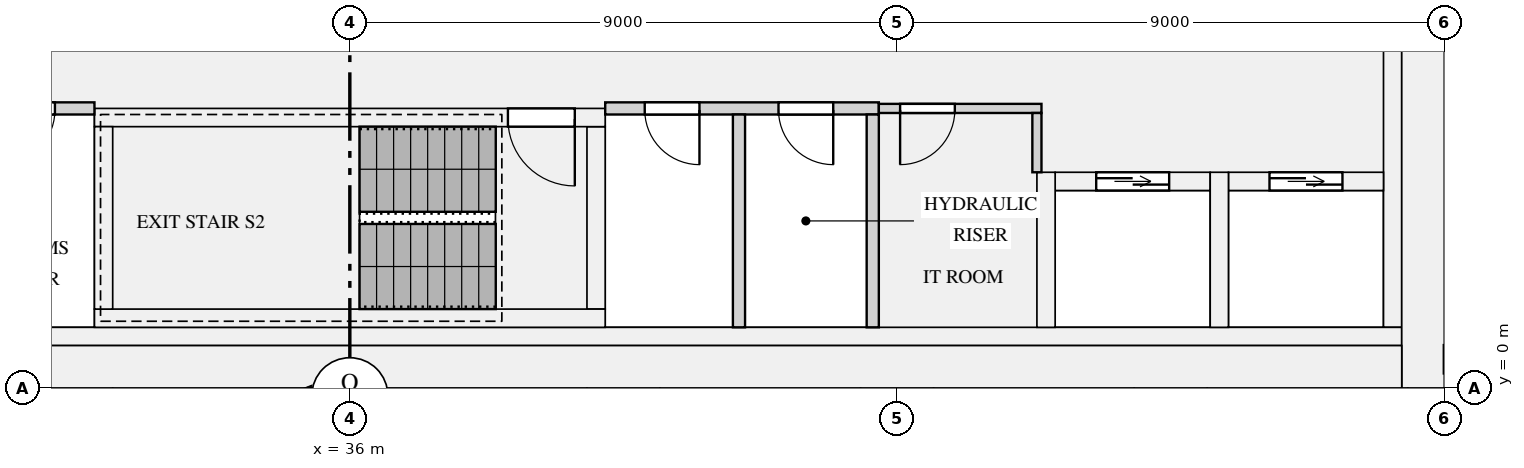
"""IFC4 building model, lengths in metres.
Left out: names, types, materials, properties, quantities, classifications, styles, units other than length and angle.
Written with IfcOpenShell. Run it as: python <this file> out.ifc"""

import sys

from ifc_helpers import new_model, si_unit, direction, frame, frame_2d, origin, place, context, subcontext, project, spatial, rectangle, extrude, element, fill, save


model = new_model("IFC4")
c1 = context("Model", 3, precision=1e-05, world=origin(), true_north=direction((0.0, 1.0)))
c2 = subcontext(c1, "Body", "Model", "MODEL_VIEW")
j1 = project(units=[si_unit("LENGTHUNIT", "METRE"), si_unit("PLANEANGLEUNIT", "RADIAN")], contexts=[c1])
p1 = place(None, origin())
s1 = spatial("IfcSite", under=j1, at=p1, CompositionType="ELEMENT")
p2 = place(p1, origin())
s2 = spatial("IfcBuilding", under=s1, at=p2, CompositionType="ELEMENT")
p3 = place(p2, frame((0.0, 0.0, 166.5)))
s3 = spatial("IfcBuildingStorey", under=s2, at=p3, CompositionType="ELEMENT", Elevation=166.5)
p4 = place(p3, frame((53.65, 0.0, 0.0), z_axis=(0.0, 0.0, 1.0), x_axis=(0.0, 1.0, 0.0)))
e1 = element("IfcWall", 1, at=p4, inside=s3, PredefinedType="SHEAR", context=c2, shape_type="SweptSolid", body=[
    extrude(rectangle(XDim=12.5, YDim=0.7, at=frame_2d((6.25, 0.0))), origin(), (0.0, 0.0, 1.0), 3.15),
])
p5 = place(p3, frame((18.7, 0.35, 0.0), z_axis=(0.0, 0.0, 1.0), x_axis=(1.0, 0.0, 0.0)))
e2 = element("IfcWall", 2, at=p5, inside=s3, PredefinedType="SHEAR", context=c2, shape_type="SweptSolid", body=[
    extrude(rectangle(XDim=34.6, YDim=0.7, at=frame_2d((17.3, 0.0))), origin(), (0.0, 0.0, 1.0), 3.15),
])
p6 = place(p3, frame((53.15, 1.0, 0.0), z_axis=(0.0, 0.0, 1.0), x_axis=(0.0, 1.0, 0.0)))
e3 = element("IfcWall", 3, at=p6, inside=s3, PredefinedType="SHEAR", context=c2, shape_type="SweptSolid", body=[
    extrude(rectangle(XDim=10.9, YDim=0.3, at=frame_2d((5.45, 0.0))), origin(), (0.0, 0.0, 1.0), 3.15),
])
p7 = place(p3, frame((18.7, 0.85, 0.0), z_axis=(0.0, 0.0, 1.0), x_axis=(1.0, 0.0, 0.0)))
e4 = element("IfcWall", 4, at=p7, inside=s3, PredefinedType="SHEAR", context=c2, shape_type="SweptSolid", body=[
    extrude(rectangle(XDim=34.6, YDim=0.3, at=frame_2d((17.3, 0.0))), origin(), (0.0, 0.0, 1.0), 3.15),
])
p8 = place(p3, frame((47.6, 3.4, 0.0), z_axis=(0.0, 0.0, 1.0), x_axis=(1.0, 0.0, 0.0)))
e5 = element("IfcWall", 5, at=p8, inside=s3, PredefinedType="SHEAR", context=c2, shape_type="SweptSolid", body=[
    extrude(rectangle(XDim=2.55, YDim=0.3, at=frame_2d((1.275, 0.0))), origin(), (0.0, 0.0, 1.0), 3.15),
])
p9 = place(p8, frame((0.675, 0.0, 0.0)))
e6 = element("IfcOpeningElement", 6, at=p9, cuts=e5, PredefinedType="OPENING", context=c2, shape_type="SweptSolid", body=[
    extrude(rectangle(XDim=1.2, YDim=2.1, at=frame_2d((0.6, 1.05))), frame((0.0, 0.16, 0.0), z_axis=(0.0, -1.0, 0.0), x_axis=(1.0, 0.0, 0.0)), (0.0, 0.0, 1.0), 0.32),
])
p10 = place(p3, frame((47.45, 1.0, 0.0), z_axis=(0.0, 0.0, 1.0), x_axis=(0.0, 1.0, 0.0)))
e7 = element("IfcWall", 7, at=p10, inside=s3, PredefinedType="SHEAR", context=c2, shape_type="SweptSolid", body=[
    extrude(rectangle(XDim=2.55, YDim=0.3, at=frame_2d((1.275, 0.0))), origin(), (0.0, 0.0, 1.0), 3.15),
])
p11 = place(p3, frame((50.45, 3.4, 0.0), z_axis=(0.0, 0.0, 1.0), x_axis=(1.0, 0.0, 0.0)))
e8 = element("IfcWall", 8, at=p11, inside=s3, PredefinedType="SHEAR", context=c2, shape_type="SweptSolid", body=[
    extrude(rectangle(XDim=2.55, YDim=0.3, at=frame_2d((1.275, 0.0))), origin(), (0.0, 0.0, 1.0), 3.15),
])
p12 = place(p11, frame((0.675, 0.0, 0.0)))
e9 = element("IfcOpeningElement", 9, at=p12, cuts=e8, PredefinedType="OPENING", context=c2, shape_type="SweptSolid", body=[
    extrude(rectangle(XDim=1.2, YDim=2.1, at=frame_2d((0.6, 1.05))), frame((0.0, 0.16, 0.0), z_axis=(0.0, -1.0, 0.0), x_axis=(1.0, 0.0, 0.0)), (0.0, 0.0, 1.0), 0.32),
])
p13 = place(p3, frame((50.3, 1.0, 0.0), z_axis=(0.0, 0.0, 1.0), x_axis=(0.0, 1.0, 0.0)))
e10 = element("IfcWall", 10, at=p13, inside=s3, PredefinedType="SHEAR", context=c2, shape_type="SweptSolid", body=[
    extrude(rectangle(XDim=2.55, YDim=0.3, at=frame_2d((1.275, 0.0))), origin(), (0.0, 0.0, 1.0), 3.15),
])
p14 = place(p3, frame((31.8, 1.15, 0.0), z_axis=(0.0, 0.0, 1.0), x_axis=(1.0, 0.0, 0.0)))
e11 = element("IfcWall", 11, at=p14, inside=s3, PredefinedType="SHEAR", context=c2, shape_type="SweptSolid", body=[
    extrude(rectangle(XDim=8.4, YDim=0.3, at=frame_2d((4.2, 0.0))), origin(), (0.0, 0.0, 1.0), 3.15),
])
p15 = place(p3, frame((31.8, 4.45, 0.0), z_axis=(0.0, 0.0, 1.0), x_axis=(1.0, 0.0, 0.0)))
e12 = element("IfcWall", 12, at=p15, inside=s3, PredefinedType="SHEAR", context=c2, shape_type="SweptSolid", body=[
    extrude(rectangle(XDim=8.4, YDim=0.3, at=frame_2d((4.2, 0.0))), origin(), (0.0, 0.0, 1.0), 3.15),
])
p16 = place(p15, frame((6.8, 0.0, 0.0)))
e13 = element("IfcOpeningElement", 13, at=p16, cuts=e12, PredefinedType="OPENING", context=c2, shape_type="SweptSolid", body=[
    extrude(rectangle(XDim=1.1, YDim=2.1, at=frame_2d((0.55, 1.05))), frame((0.0, 0.16, 0.0), z_axis=(0.0, -1.0, 0.0), x_axis=(1.0, 0.0, 0.0)), (0.0, 0.0, 1.0), 0.32),
])
for number, where, z_axis, x_axis in (
    (14, (31.95, 1.3, 0.0), (0.0, 0.0, 1.0), (0.0, 1.0, 0.0)),
    (15, (40.05, 1.3, 0.0), (0.0, 0.0, 1.0), (0.0, 1.0, 0.0)),
):
    element("IfcWall", number, at=place(p3, frame(where, z_axis=z_axis, x_axis=x_axis)), inside=s3, PredefinedType="SHEAR", context=c2, shape_type="SweptSolid", body=[
        extrude(rectangle(XDim=3.0, YDim=0.3, at=frame_2d((1.5, 0.0))), origin(), (0.0, 0.0, 1.0), 3.15),
    ])
p17 = place(p3, frame((27.3, 4.6, 0.0), z_axis=(0.0, 0.0, 1.0), x_axis=(1.0, 0.0, 0.0)))
e16 = element("IfcWall", 16, at=p17, inside=s3, PredefinedType="PARTITIONING", context=c2, shape_type="SweptSolid", body=[
    extrude(rectangle(XDim=4.5, YDim=0.2, at=frame_2d((2.25, 0.0))), origin(), (0.0, 0.0, 1.0), 2.83),
])
p18 = place(p17, frame((0.75, 0.0, 0.0)))
e17 = element("IfcOpeningElement", 17, at=p18, cuts=e16, PredefinedType="OPENING", context=c2, shape_type="SweptSolid", body=[
    extrude(rectangle(XDim=0.9, YDim=2.1, at=frame_2d((0.45, 1.05))), frame((0.0, 0.11, 0.0), z_axis=(0.0, -1.0, 0.0), x_axis=(1.0, 0.0, 0.0)), (0.0, 0.0, 1.0), 0.22),
])
p19 = place(p17, frame((2.95, 0.0, 0.0)))
e18 = element("IfcOpeningElement", 18, at=p19, cuts=e16, PredefinedType="OPENING", context=c2, shape_type="SweptSolid", body=[
    extrude(rectangle(XDim=0.9, YDim=2.1, at=frame_2d((0.45, 1.05))), frame((0.0, 0.11, 0.0), z_axis=(0.0, -1.0, 0.0), x_axis=(1.0, 0.0, 0.0)), (0.0, 0.0, 1.0), 0.22),
])
p20 = place(p3, frame((40.2, 4.6, 0.0), z_axis=(0.0, 0.0, 1.0), x_axis=(1.0, 0.0, 0.0)))
e19 = element("IfcWall", 19, at=p20, inside=s3, PredefinedType="PARTITIONING", context=c2, shape_type="SweptSolid", body=[
    extrude(rectangle(XDim=4.5, YDim=0.2, at=frame_2d((2.25, 0.0))), origin(), (0.0, 0.0, 1.0), 2.83),
])
p21 = place(p20, frame((0.65, 0.0, 0.0)))
e20 = element("IfcOpeningElement", 20, at=p21, cuts=e19, PredefinedType="OPENING", context=c2, shape_type="SweptSolid", body=[
    extrude(rectangle(XDim=0.9, YDim=2.1, at=frame_2d((0.45, 1.05))), frame((0.0, 0.11, 0.0), z_axis=(0.0, -1.0, 0.0), x_axis=(1.0, 0.0, 0.0)), (0.0, 0.0, 1.0), 0.22),
])
p22 = place(p20, frame((2.85, 0.0, 0.0)))
e21 = element("IfcOpeningElement", 21, at=p22, cuts=e19, PredefinedType="OPENING", context=c2, shape_type="SweptSolid", body=[
    extrude(rectangle(XDim=0.9, YDim=2.1, at=frame_2d((0.45, 1.05))), frame((0.0, 0.11, 0.0), z_axis=(0.0, -1.0, 0.0), x_axis=(1.0, 0.0, 0.0)), (0.0, 0.0, 1.0), 0.22),
])
p23 = place(p3, frame((44.7, 4.6, 0.0), z_axis=(0.0, 0.0, 1.0), x_axis=(1.0, 0.0, 0.0)))
e22 = element("IfcWall", 22, at=p23, inside=s3, PredefinedType="PARTITIONING", context=c2, shape_type="SweptSolid", body=[
    extrude(rectangle(XDim=2.675, YDim=0.15, at=frame_2d((1.337, 0.0))), origin(), (0.0, 0.0, 1.0), 2.83),
])
p24 = place(p23, frame((0.35, 0.0, 0.0)))
e23 = element("IfcOpeningElement", 23, at=p24, cuts=e22, PredefinedType="OPENING", context=c2, shape_type="SweptSolid", body=[
    extrude(rectangle(XDim=0.9, YDim=2.1, at=frame_2d((0.45, 1.05))), frame((0.0, 0.085, 0.0), z_axis=(0.0, -1.0, 0.0), x_axis=(1.0, 0.0, 0.0)), (0.0, 0.0, 1.0), 0.17),
])
for number, where, z_axis, x_axis in (
    (24, (42.4, 1.0, 0.0), (0.0, 0.0, 1.0), (0.0, 1.0, 0.0)),
    (25, (44.6, 1.0, 0.0), (0.0, 0.0, 1.0), (0.0, 1.0, 0.0)),
):
    element("IfcWall", number, at=place(p3, frame(where, z_axis=z_axis, x_axis=x_axis)), inside=s3, PredefinedType="PARTITIONING", context=c2, shape_type="SweptSolid", body=[
        extrude(rectangle(XDim=3.5, YDim=0.2, at=frame_2d((1.75, 0.0))), origin(), (0.0, 0.0, 1.0), 2.83),
    ])
p25 = place(p3, frame((47.3, 3.55, 0.0), z_axis=(0.0, 0.0, 1.0), x_axis=(0.0, 1.0, 0.0)))
e26 = element("IfcWall", 26, at=p25, inside=s3, PredefinedType="PARTITIONING", context=c2, shape_type="SweptSolid", body=[
    extrude(rectangle(XDim=0.975, YDim=0.15, at=frame_2d((0.487, 0.0))), origin(), (0.0, 0.0, 1.0), 2.83),
])
p26 = place(p9, origin())
e27 = element("IfcDoor", 27, at=p26, inside=s3, OperationType="DOUBLE_DOOR_SLIDING", PredefinedType="DOOR", context=c2, shape_type="SweptSolid", body=[
    extrude(rectangle(XDim=1.2, YDim=2.1, at=frame_2d((0.6, 1.05))), frame((0.0, 0.025, 0.0), z_axis=(0.0, -1.0, 0.0), x_axis=(1.0, 0.0, 0.0)), (0.0, 0.0, 1.0), 0.05),
])
fill(e6, e27)
p27 = place(p12, origin())
e28 = element("IfcDoor", 28, at=p27, inside=s3, OperationType="DOUBLE_DOOR_SLIDING", PredefinedType="DOOR", context=c2, shape_type="SweptSolid", body=[
    extrude(rectangle(XDim=1.2, YDim=2.1, at=frame_2d((0.6, 1.05))), frame((0.0, 0.025, 0.0), z_axis=(0.0, -1.0, 0.0), x_axis=(1.0, 0.0, 0.0)), (0.0, 0.0, 1.0), 0.05),
])
fill(e9, e28)
p28 = place(p16, frame((1.1, 0.0, 0.0), z_axis=(0.0, 0.0, 1.0), x_axis=(-1.0, 0.0, 0.0)))
e29 = element("IfcDoor", 29, at=p28, inside=s3, OperationType="SINGLE_SWING_LEFT", PredefinedType="DOOR", context=c2, shape_type="SweptSolid", body=[
    extrude(rectangle(XDim=1.1, YDim=2.1, at=frame_2d((0.55, 1.05))), frame((0.0, 0.025, 0.0), z_axis=(0.0, -1.0, 0.0), x_axis=(1.0, 0.0, 0.0)), (0.0, 0.0, 1.0), 0.05),
])
fill(e13, e29)
p29 = place(p24, frame((0.9, 0.0, 0.0), z_axis=(0.0, 0.0, 1.0), x_axis=(-1.0, 0.0, 0.0)))
e30 = element("IfcDoor", 30, at=p29, inside=s3, OperationType="SINGLE_SWING_RIGHT", PredefinedType="DOOR", context=c2, shape_type="SweptSolid", body=[
    extrude(rectangle(XDim=0.9, YDim=2.1, at=frame_2d((0.45, 1.05))), frame((0.0, 0.025, 0.0), z_axis=(0.0, -1.0, 0.0), x_axis=(1.0, 0.0, 0.0)), (0.0, 0.0, 1.0), 0.05),
])
fill(e23, e30)
p30 = place(p19, frame((0.9, 0.0, 0.0), z_axis=(0.0, 0.0, 1.0), x_axis=(-1.0, 0.0, 0.0)))
e31 = element("IfcDoor", 31, at=p30, inside=s3, OperationType="SINGLE_SWING_RIGHT", PredefinedType="DOOR", context=c2, shape_type="SweptSolid", body=[
    extrude(rectangle(XDim=0.9, YDim=2.1, at=frame_2d((0.45, 1.05))), frame((0.0, 0.025, 0.0), z_axis=(0.0, -1.0, 0.0), x_axis=(1.0, 0.0, 0.0)), (0.0, 0.0, 1.0), 0.05),
])
fill(e18, e31)
p31 = place(p21, frame((0.9, 0.0, 0.0), z_axis=(0.0, 0.0, 1.0), x_axis=(-1.0, 0.0, 0.0)))
e32 = element("IfcDoor", 32, at=p31, inside=s3, OperationType="SINGLE_SWING_LEFT", PredefinedType="DOOR", context=c2, shape_type="SweptSolid", body=[
    extrude(rectangle(XDim=0.9, YDim=2.1, at=frame_2d((0.45, 1.05))), frame((0.0, 0.025, 0.0), z_axis=(0.0, -1.0, 0.0), x_axis=(1.0, 0.0, 0.0)), (0.0, 0.0, 1.0), 0.05),
])
fill(e20, e32)
p32 = place(p22, frame((0.9, 0.0, 0.0), z_axis=(0.0, 0.0, 1.0), x_axis=(-1.0, 0.0, 0.0)))
e33 = element("IfcDoor", 33, at=p32, inside=s3, OperationType="SINGLE_SWING_LEFT", PredefinedType="DOOR", context=c2, shape_type="SweptSolid", body=[
    extrude(rectangle(XDim=0.9, YDim=2.1, at=frame_2d((0.45, 1.05))), frame((0.0, 0.025, 0.0), z_axis=(0.0, -1.0, 0.0), x_axis=(1.0, 0.0, 0.0)), (0.0, 0.0, 1.0), 0.05),
])
fill(e21, e33)
save(model, sys.argv[1])
